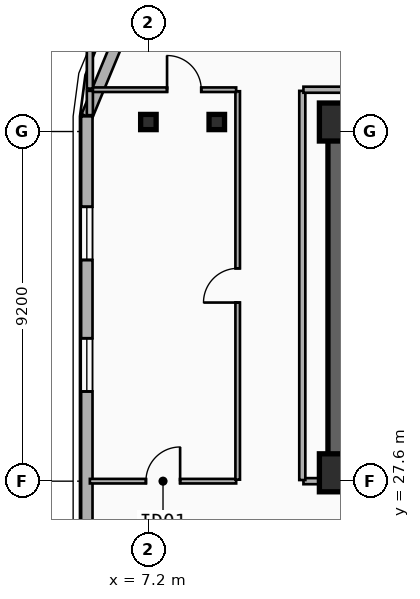
"""IFC4 building model, lengths in metres.
Left out: names, types, materials, properties, quantities, classifications, styles, units other than length and angle.
Written with IfcOpenShell. Run it as: python <this file> out.ifc"""

import sys

from ifc_helpers import new_model, si_unit, direction, frame, frame_2d, origin, origin_2d, place, context, subcontext, project, spatial, rectangle, i_section, extrude, element, fill, save


model = new_model("IFC4")
c1 = context("Model", 3, precision=1e-05, world=origin(), true_north=direction((0.0, 1.0)))
c2 = subcontext(c1, "Body", "Model", "MODEL_VIEW")
j1 = project(units=[si_unit("LENGTHUNIT", "METRE"), si_unit("PLANEANGLEUNIT", "RADIAN")], contexts=[c1])
p1 = place(None, origin())
s1 = spatial("IfcSite", under=j1, at=p1, CompositionType="ELEMENT")
p2 = place(p1, origin())
s2 = spatial("IfcBuilding", under=s1, at=p2, CompositionType="ELEMENT")
p3 = place(p2, frame((0.0, 0.0, 214.8)))
s3 = spatial("IfcBuildingStorey", under=s2, at=p3, CompositionType="ELEMENT", Elevation=214.8)
p4 = place(p3, frame((12.15, 37.05, 0.0), z_axis=(0.0, 0.0, 1.0), x_axis=(1.0, 0.0, 0.0)))
e1 = element("IfcWall", 1, at=p4, inside=s3, PredefinedType="SHEAR", context=c2, shape_type="SweptSolid", body=[
    extrude(rectangle(XDim=33.23, YDim=0.45, at=frame_2d((16.615, 0.0))), origin(), (0.0, 0.0, 1.0), 3.6),
])
p5 = place(p3, frame((21.18, 27.82, 0.0), z_axis=(0.0, 0.0, 1.0), x_axis=(-1.0, 0.0, 0.0)))
e2 = element("IfcWall", 2, at=p5, inside=s3, PredefinedType="SHEAR", context=c2, shape_type="SweptSolid", body=[
    extrude(rectangle(XDim=9.03, YDim=0.45, at=frame_2d((4.515, 0.0))), origin(), (0.0, 0.0, 1.0), 3.6),
])
p6 = place(p5, frame((2.68, 0.0, 0.0)))
e3 = element("IfcOpeningElement", 3, at=p6, cuts=e2, PredefinedType="OPENING", context=c2, shape_type="SweptSolid", body=[
    extrude(rectangle(XDim=1.1, YDim=2.15, at=frame_2d((0.55, 1.075))), frame((0.0, 0.235, 0.0), z_axis=(0.0, -1.0, 0.0), x_axis=(1.0, 0.0, 0.0)), (0.0, 0.0, 1.0), 0.47),
])
p7 = place(p3, frame((12.15, 28.045, 0.0), z_axis=(0.0, 0.0, 1.0), x_axis=(0.0, 1.0, 0.0)))
e4 = element("IfcWall", 4, at=p7, inside=s3, PredefinedType="SHEAR", context=c2, shape_type="SweptSolid", body=[
    extrude(rectangle(XDim=8.78, YDim=0.45, at=frame_2d((4.39, 0.0))), origin(), (0.0, 0.0, 1.0), 3.6),
])
for number, where, z_axis, x_axis in (
    (5, (12.2, 27.82, 0.0), (0.0, 0.0, 1.0), (1.0, 0.0, 0.0)),
    (6, (12.2, 37.05, 0.0), (0.0, 0.0, 1.0), (1.0, 0.0, 0.0)),
):
    element("IfcColumn", number, at=place(p3, frame(where, z_axis=z_axis, x_axis=x_axis)), inside=s3, PredefinedType="COLUMN", context=c2, shape_type="SweptSolid", body=[
        extrude(rectangle(XDim=1.0, YDim=1.0, at=origin_2d()), origin(), (0.0, 0.0, 1.0), 3.6),
    ])
for number, where, z_axis, x_axis in (
    (7, (9.0, 37.05, 0.0), (0.0, 0.0, 1.0), (1.0, 0.0, 0.0)),
    (8, (7.2, 37.05, 0.0), (0.0, 0.0, 1.0), (1.0, 0.0, 0.0)),
):
    element("IfcColumn", number, at=place(p3, frame(where, z_axis=z_axis, x_axis=x_axis)), inside=s3, PredefinedType="COLUMN", context=c2, shape_type="SweptSolid", body=[
        extrude(i_section(OverallWidth=0.408, OverallDepth=0.4, WebThickness=0.025, FlangeThickness=0.039, FilletRadius=0.015, at=origin_2d()), origin(), (0.0, 0.0, 1.0), 3.6),
    ])
p8 = place(p3, frame((5.58, 37.2, 0.0), z_axis=(0.0, 0.0, 1.0), x_axis=(0.382636798336, 0.92389884758, 0.0)))
e9 = element("IfcWall", 9, at=p8, inside=s3, PredefinedType="SOLIDWALL", context=c2, shape_type="SweptSolid", body=[
    extrude(rectangle(XDim=3.077, YDim=0.3, at=frame_2d((1.538, 0.0))), origin(), (0.0, 0.0, 1.0), 3.34),
])
p9 = place(p3, frame((5.58, 8.6, 0.0), z_axis=(0.0, 0.0, 1.0), x_axis=(0.0, 1.0, 0.0)))
e10 = element("IfcWall", 10, at=p9, inside=s3, PredefinedType="SOLIDWALL", context=c2, shape_type="SweptSolid", body=[
    extrude(rectangle(XDim=28.6, YDim=0.3, at=frame_2d((14.3, 0.0))), origin(), (0.0, 0.0, 1.0), 3.34),
])
p10 = place(p9, frame((21.36, 0.0, 0.34)))
e11 = element("IfcOpeningElement", 11, at=p10, cuts=e10, PredefinedType="OPENING", context=c2, shape_type="SweptSolid", body=[
    extrude(rectangle(XDim=1.4, YDim=2.1, at=frame_2d((0.7, 1.05))), frame((0.0, 0.16, 0.0), z_axis=(0.0, -1.0, 0.0), x_axis=(1.0, 0.0, 0.0)), (0.0, 0.0, 1.0), 0.32),
])
p11 = place(p9, frame((24.82, 0.0, 0.34)))
e12 = element("IfcOpeningElement", 12, at=p11, cuts=e10, PredefinedType="OPENING", context=c2, shape_type="SweptSolid", body=[
    extrude(rectangle(XDim=1.4, YDim=2.1, at=frame_2d((0.7, 1.05))), frame((0.0, 0.16, 0.0), z_axis=(0.0, -1.0, 0.0), x_axis=(1.0, 0.0, 0.0)), (0.0, 0.0, 1.0), 0.32),
])
p12 = place(p9, frame((2.671, 0.0, 0.34)))
e13 = element("IfcOpeningElement", 13, at=p12, cuts=e10, PredefinedType="OPENING", context=c2, shape_type="SweptSolid", body=[
    extrude(rectangle(XDim=1.4, YDim=2.1, at=frame_2d((0.7, 1.05))), frame((0.0, 0.16, 0.0), z_axis=(0.0, -1.0, 0.0), x_axis=(1.0, 0.0, 0.0)), (0.0, 0.0, 1.0), 0.32),
])
p13 = place(p9, frame((6.679, 0.0, 0.34)))
e14 = element("IfcOpeningElement", 14, at=p13, cuts=e10, PredefinedType="OPENING", context=c2, shape_type="SweptSolid", body=[
    extrude(rectangle(XDim=1.4, YDim=2.1, at=frame_2d((0.7, 1.05))), frame((0.0, 0.16, 0.0), z_axis=(0.0, -1.0, 0.0), x_axis=(1.0, 0.0, 0.0)), (0.0, 0.0, 1.0), 0.32),
])
p14 = place(p9, frame((10.467, 0.0, 0.34)))
e15 = element("IfcOpeningElement", 15, at=p14, cuts=e10, PredefinedType="OPENING", context=c2, shape_type="SweptSolid", body=[
    extrude(rectangle(XDim=1.4, YDim=2.1, at=frame_2d((0.7, 1.05))), frame((0.0, 0.16, 0.0), z_axis=(0.0, -1.0, 0.0), x_axis=(1.0, 0.0, 0.0)), (0.0, 0.0, 1.0), 0.32),
])
p15 = place(p9, frame((14.256, 0.0, 0.34)))
e16 = element("IfcOpeningElement", 16, at=p15, cuts=e10, PredefinedType="OPENING", context=c2, shape_type="SweptSolid", body=[
    extrude(rectangle(XDim=1.4, YDim=2.1, at=frame_2d((0.7, 1.05))), frame((0.0, 0.16, 0.0), z_axis=(0.0, -1.0, 0.0), x_axis=(1.0, 0.0, 0.0)), (0.0, 0.0, 1.0), 0.32),
])
p16 = place(p3, frame((5.66, 27.6, 0.0), z_axis=(0.0, 0.0, 1.0), x_axis=(1.0, 0.0, 0.0)))
e17 = element("IfcWall", 17, at=p16, inside=s3, PredefinedType="PARTITIONING", context=c2, shape_type="SweptSolid", body=[
    extrude(rectangle(XDim=3.85, YDim=0.12, at=frame_2d((1.925, 0.0))), origin(), (0.0, 0.0, 1.0), 2.67),
])
p17 = place(p16, frame((1.475, 0.0, 0.0)))
e18 = element("IfcOpeningElement", 18, at=p17, cuts=e17, PredefinedType="OPENING", context=c2, shape_type="SweptSolid", body=[
    extrude(rectangle(XDim=0.9, YDim=2.1, at=frame_2d((0.45, 1.05))), frame((0.0, 0.07, 0.0), z_axis=(0.0, -1.0, 0.0), x_axis=(1.0, 0.0, 0.0)), (0.0, 0.0, 1.0), 0.14),
])
p18 = place(p3, frame((9.55, 27.64, 0.0), z_axis=(0.0, 0.0, 1.0), x_axis=(0.0, 1.0, 0.0)))
e19 = element("IfcWall", 19, at=p18, inside=s3, PredefinedType="PARTITIONING", context=c2, shape_type="SweptSolid", body=[
    extrude(rectangle(XDim=10.22, YDim=0.12, at=frame_2d((5.11, 0.0))), origin(), (0.0, 0.0, 1.0), 2.82),
])
p19 = place(p18, frame((4.66, 0.0, 0.0)))
e20 = element("IfcOpeningElement", 20, at=p19, cuts=e19, PredefinedType="OPENING", context=c2, shape_type="SweptSolid", body=[
    extrude(rectangle(XDim=0.9, YDim=2.1, at=frame_2d((0.45, 1.05))), frame((0.0, 0.07, 0.0), z_axis=(0.0, -1.0, 0.0), x_axis=(1.0, 0.0, 0.0)), (0.0, 0.0, 1.0), 0.14),
])
p20 = place(p3, frame((5.66, 37.9, 0.0), z_axis=(0.0, 0.0, 1.0), x_axis=(1.0, 0.0, 0.0)))
e21 = element("IfcWall", 21, at=p20, inside=s3, PredefinedType="PARTITIONING", context=c2, shape_type="SweptSolid", body=[
    extrude(rectangle(XDim=3.85, YDim=0.12, at=frame_2d((1.925, 0.0))), origin(), (0.0, 0.0, 1.0), 3.34),
])
p21 = place(p20, frame((2.031, 0.0, 0.0)))
e22 = element("IfcOpeningElement", 22, at=p21, cuts=e21, PredefinedType="OPENING", context=c2, shape_type="SweptSolid", body=[
    extrude(rectangle(XDim=0.9, YDim=2.1, at=frame_2d((0.45, 1.05))), frame((0.0, 0.07, 0.0), z_axis=(0.0, -1.0, 0.0), x_axis=(1.0, 0.0, 0.0)), (0.0, 0.0, 1.0), 0.14),
])
p22 = place(p3, frame((11.28, 27.6, 0.0), z_axis=(0.0, 0.0, 1.0), x_axis=(1.0, 0.0, 0.0)))
e23 = element("IfcWall", 23, at=p22, inside=s3, PredefinedType="PARTITIONING", context=c2, shape_type="SweptSolid", body=[
    extrude(rectangle(XDim=0.84, YDim=0.16, at=frame_2d((0.42, 0.0))), origin(), (0.0, 0.0, 1.0), 2.41),
])
p23 = place(p3, frame((11.25, 27.63, 0.0), z_axis=(0.0, 0.0, 1.0), x_axis=(0.0, 1.0, 0.0)))
e24 = element("IfcWall", 24, at=p23, inside=s3, PredefinedType="PARTITIONING", context=c2, shape_type="SweptSolid", body=[
    extrude(rectangle(XDim=10.24, YDim=0.16, at=frame_2d((5.12, 0.0))), origin(), (0.0, 0.0, 1.0), 2.82),
])
p24 = place(p3, frame((11.28, 37.9, 0.0), z_axis=(0.0, 0.0, 1.0), x_axis=(1.0, 0.0, 0.0)))
e25 = element("IfcWall", 25, at=p24, inside=s3, PredefinedType="PARTITIONING", context=c2, shape_type="SweptSolid", body=[
    extrude(rectangle(XDim=35.04, YDim=0.16, at=frame_2d((17.52, 0.0))), origin(), (0.0, 0.0, 1.0), 3.34),
])
p25 = place(p3, frame((5.66, 37.93, 0.0), z_axis=(0.0, 0.0, 1.0), x_axis=(0.0, 1.0, 0.0)))
e26 = element("IfcWall", 26, at=p25, inside=s3, PredefinedType="PARTITIONING", context=c2, shape_type="SweptSolid", body=[
    extrude(rectangle(XDim=1.44, YDim=0.16, at=frame_2d((0.72, 0.0))), origin(), (0.0, 0.0, 1.0), 3.34),
])
p26 = place(p3, frame((5.66, 37.23, 0.0), z_axis=(0.0, 0.0, 1.0), x_axis=(0.0, 1.0, 0.0)))
e27 = element("IfcWall", 27, at=p26, inside=s3, PredefinedType="PARTITIONING", context=c2, shape_type="SweptSolid", body=[
    extrude(rectangle(XDim=0.64, YDim=0.16, at=frame_2d((0.32, 0.0))), origin(), (0.0, 0.0, 1.0), 3.34),
])
p27 = place(p10, origin())
e28 = element("IfcWindow", 28, at=p27, inside=s3, PartitioningType="SINGLE_PANEL", PredefinedType="WINDOW", context=c2, shape_type="SweptSolid", body=[
    extrude(rectangle(XDim=1.4, YDim=2.1, at=frame_2d((0.7, 1.05))), frame((0.0, 0.03, 0.0), z_axis=(0.0, -1.0, 0.0), x_axis=(1.0, 0.0, 0.0)), (0.0, 0.0, 1.0), 0.06),
])
fill(e11, e28)
p28 = place(p11, origin())
e29 = element("IfcWindow", 29, at=p28, inside=s3, PartitioningType="SINGLE_PANEL", PredefinedType="WINDOW", context=c2, shape_type="SweptSolid", body=[
    extrude(rectangle(XDim=1.4, YDim=2.1, at=frame_2d((0.7, 1.05))), frame((0.0, 0.03, 0.0), z_axis=(0.0, -1.0, 0.0), x_axis=(1.0, 0.0, 0.0)), (0.0, 0.0, 1.0), 0.06),
])
fill(e12, e29)
p29 = place(p17, origin())
e30 = element("IfcDoor", 30, at=p29, inside=s3, OperationType="SINGLE_SWING_RIGHT", PredefinedType="DOOR", context=c2, shape_type="SweptSolid", body=[
    extrude(rectangle(XDim=0.9, YDim=2.1, at=frame_2d((0.45, 1.05))), frame((0.0, 0.025, 0.0), z_axis=(0.0, -1.0, 0.0), x_axis=(1.0, 0.0, 0.0)), (0.0, 0.0, 1.0), 0.05),
])
fill(e18, e30)
p30 = place(p19, origin())
e31 = element("IfcDoor", 31, at=p30, inside=s3, OperationType="SINGLE_SWING_LEFT", PredefinedType="DOOR", context=c2, shape_type="SweptSolid", body=[
    extrude(rectangle(XDim=0.9, YDim=2.1, at=frame_2d((0.45, 1.05))), frame((0.0, 0.025, 0.0), z_axis=(0.0, -1.0, 0.0), x_axis=(1.0, 0.0, 0.0)), (0.0, 0.0, 1.0), 0.05),
])
fill(e20, e31)
p31 = place(p21, origin())
e32 = element("IfcDoor", 32, at=p31, inside=s3, OperationType="SINGLE_SWING_LEFT", PredefinedType="DOOR", context=c2, shape_type="SweptSolid", body=[
    extrude(rectangle(XDim=0.9, YDim=2.1, at=frame_2d((0.45, 1.05))), frame((0.0, 0.025, 0.0), z_axis=(0.0, -1.0, 0.0), x_axis=(1.0, 0.0, 0.0)), (0.0, 0.0, 1.0), 0.05),
])
fill(e22, e32)
save(model, sys.argv[1])
